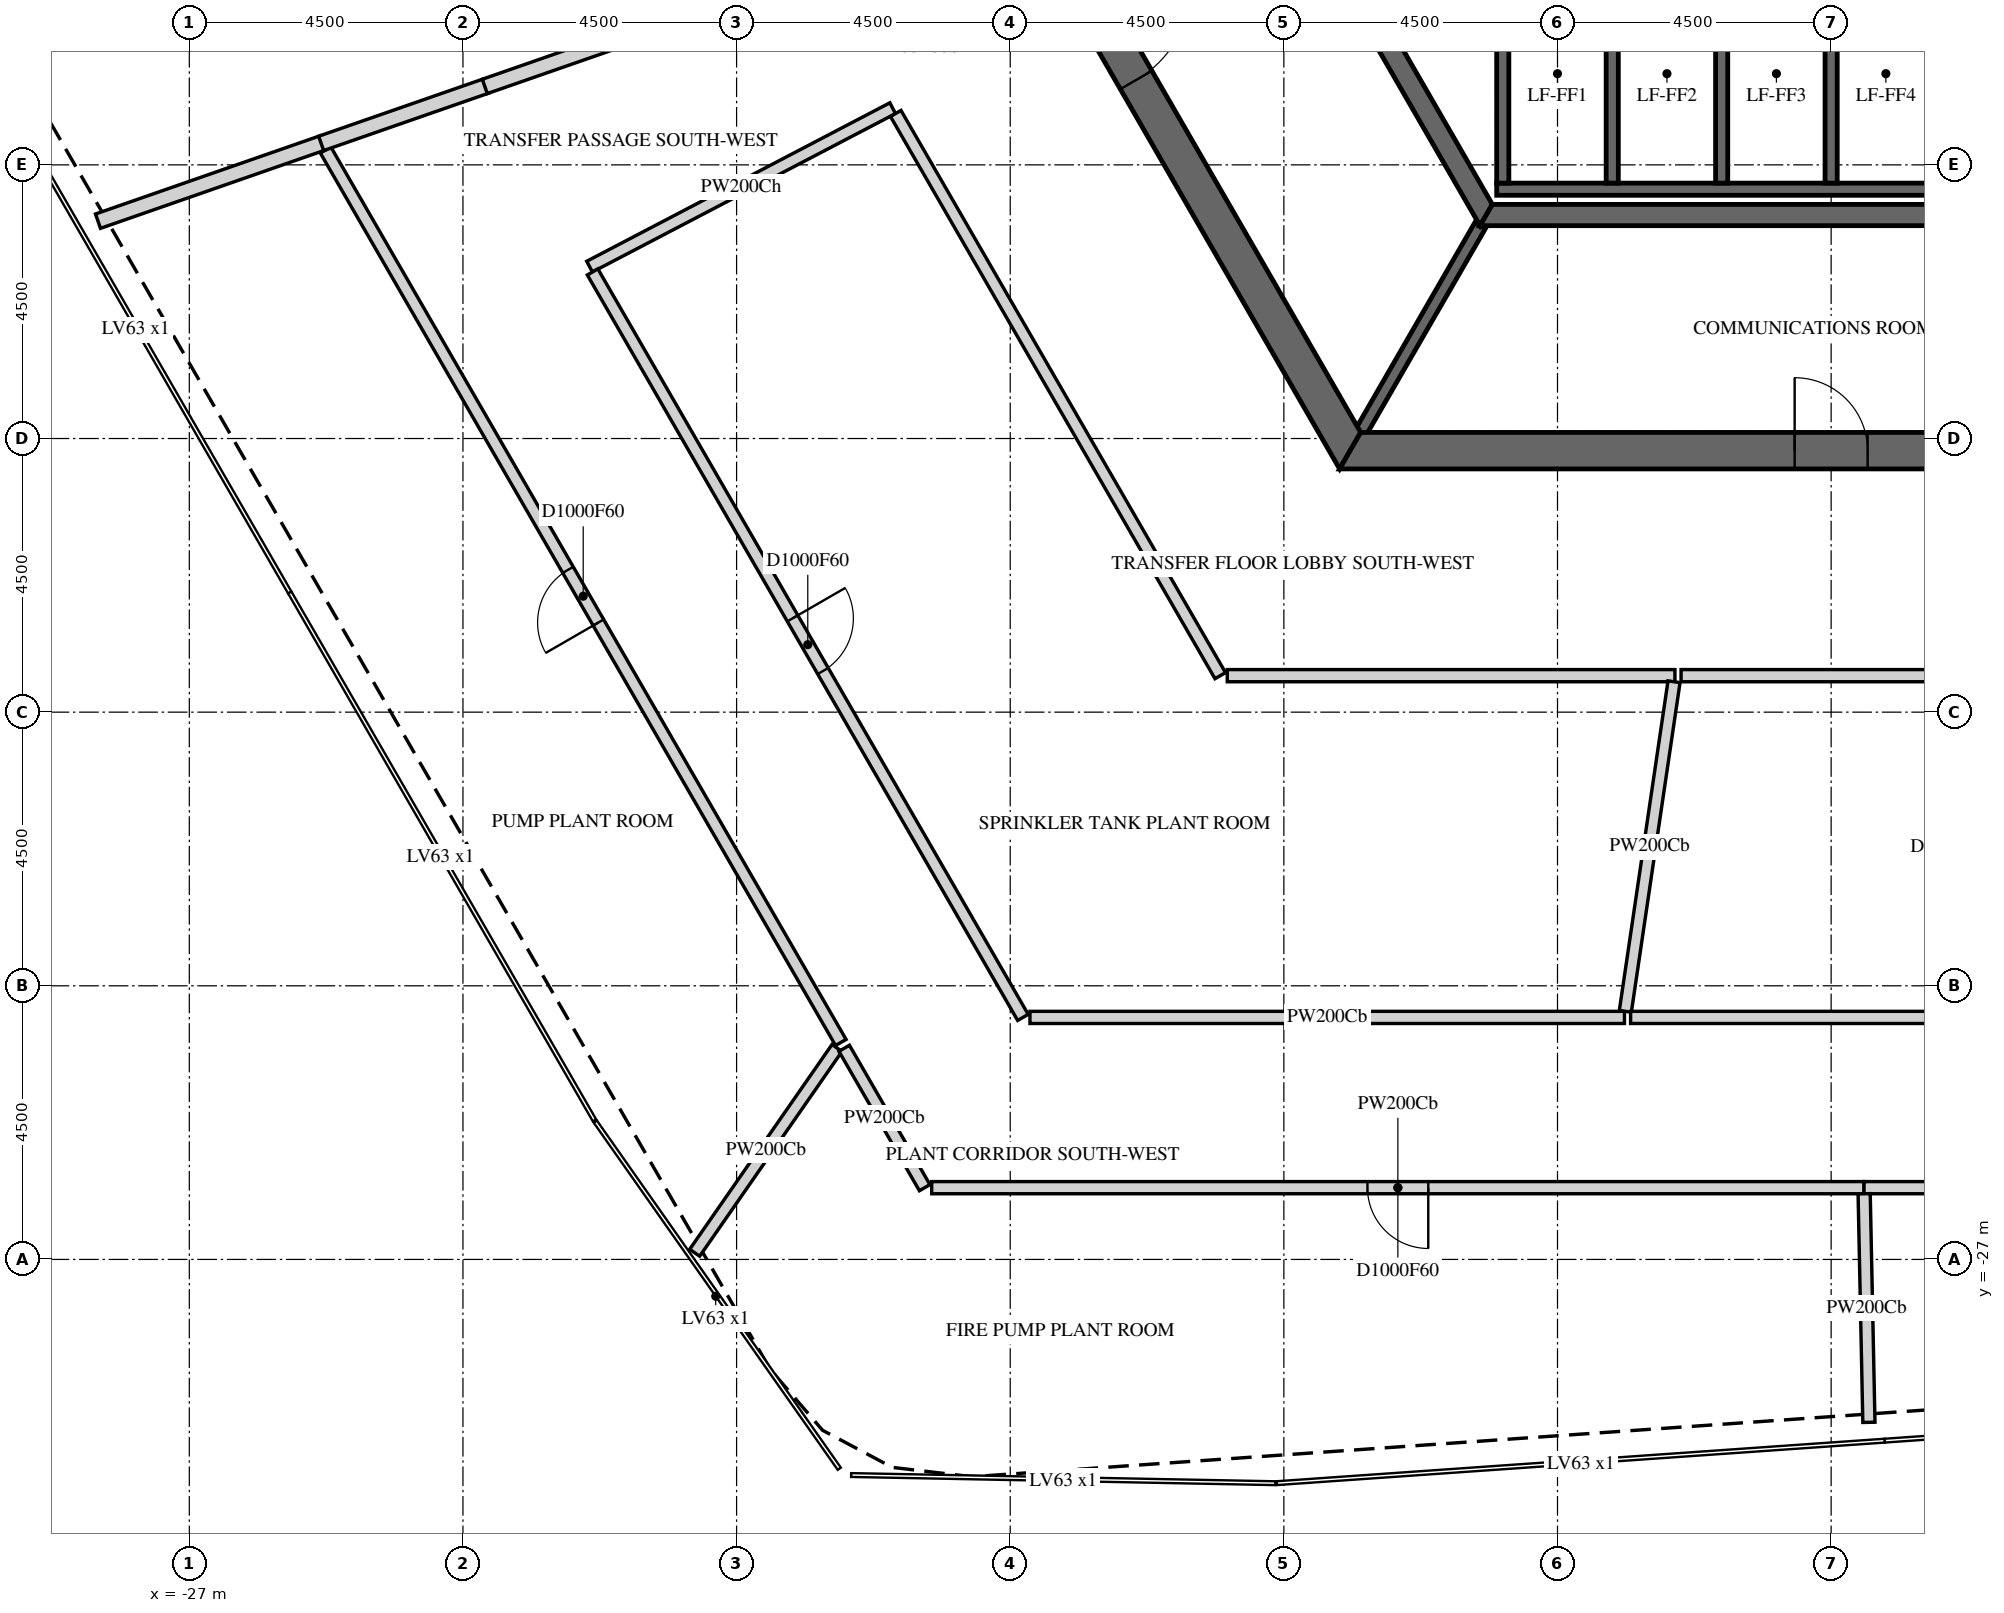
"""IFC4 building model, lengths in metres.
Left out: names, types, materials, properties, quantities, classifications, styles, units other than length and angle.
Written with IfcOpenShell. Run it as: python <this file> out.ifc"""

import sys

from ifc_helpers import new_model, si_unit, direction, frame, frame_2d, origin, place, context, subcontext, project, spatial, polyline, rectangle, outline, extrude, element, fill, save


model = new_model("IFC4")
c1 = context("Model", 3, precision=1e-05, world=origin(), true_north=direction((0.0, 1.0)))
c2 = subcontext(c1, "Body", "Model", "MODEL_VIEW")
j1 = project(units=[si_unit("LENGTHUNIT", "METRE"), si_unit("PLANEANGLEUNIT", "RADIAN")], contexts=[c1])
p1 = place(None, origin())
s1 = spatial("IfcSite", under=j1, at=p1, CompositionType="ELEMENT")
p2 = place(p1, origin())
s2 = spatial("IfcBuilding", under=s1, at=p2, CompositionType="ELEMENT")
p3 = place(p2, frame((0.0, 0.0, 31.5)))
s3 = spatial("IfcBuildingStorey", under=s2, at=p3, CompositionType="ELEMENT", Elevation=31.5)
p4 = place(p3, frame((-15.819, 0.0, -0.3), z_axis=(0.0, 0.0, 1.0), x_axis=(0.499999880136, -0.866025472988, 0.0)))
e1 = element("IfcWall", 1, at=p4, inside=s3, PredefinedType="SHEAR", context=c2, shape_type="SweptSolid", body=[
    extrude(outline(polyline([(-0.173, -0.3), (15.993, -0.3), (15.646, 0.3), (0.173, 0.3), (-0.173, -0.3)])), origin(), (0.0, 0.0, 1.0), 6.15),
])
p5 = place(p4, frame((6.981, 0.0, 0.3)))
e2 = element("IfcOpeningElement", 2, at=p5, cuts=e1, PredefinedType="OPENING", context=c2, shape_type="SweptSolid", body=[
    extrude(rectangle(XDim=1.8, YDim=2.4, at=frame_2d((0.9, 1.2))), frame((0.0, 0.31, 0.0), z_axis=(0.0, -1.0, 0.0), x_axis=(1.0, 0.0, 0.0)), (0.0, 0.0, 1.0), 0.62),
])
p6 = place(p3, frame((-7.91, -13.7, -0.3), z_axis=(0.0, 0.0, 1.0), x_axis=(1.0, 0.0, 0.0)))
e3 = element("IfcWall", 3, at=p6, inside=s3, PredefinedType="SHEAR", context=c2, shape_type="SweptSolid", body=[
    extrude(outline(polyline([(-0.173, -0.3), (15.993, -0.3), (15.646, 0.3), (0.173, 0.3), (-0.173, -0.3)])), origin(), (0.0, 0.0, 1.0), 6.15),
])
p7 = place(p6, frame((7.31, 0.0, 0.3)))
e4 = element("IfcOpeningElement", 4, at=p7, cuts=e3, PredefinedType="OPENING", context=c2, shape_type="SweptSolid", body=[
    extrude(rectangle(XDim=1.2, YDim=2.4, at=frame_2d((0.6, 1.2))), frame((0.0, 0.31, 0.0), z_axis=(0.0, -1.0, 0.0), x_axis=(1.0, 0.0, 0.0)), (0.0, 0.0, 1.0), 0.62),
])
p8 = place(p3, frame((-11.345, 0.0, -0.3), z_axis=(0.0, 0.0, 1.0), x_axis=(0.499995046907, -0.866028263435, 0.0)))
e5 = element("IfcWall", 5, at=p8, inside=s3, PredefinedType="SHEAR", context=c2, shape_type="SweptSolid", body=[
    extrude(outline(polyline([(-0.101, -0.175), (11.446, -0.175), (11.244, 0.175), (0.101, 0.175), (-0.101, -0.175)])), origin(), (0.0, 0.0, 1.0), 6.15),
])
p9 = place(p8, frame((4.744, 0.0, 0.3)))
e6 = element("IfcOpeningElement", 6, at=p9, cuts=e5, PredefinedType="OPENING", context=c2, shape_type="SweptSolid", body=[
    extrude(rectangle(XDim=1.8, YDim=2.4, at=frame_2d((0.9, 1.2))), frame((0.0, 0.185, 0.0), z_axis=(0.0, -1.0, 0.0), x_axis=(1.0, 0.0, 0.0)), (0.0, 0.0, 1.0), 0.37),
])
p10 = place(p3, frame((-5.673, -9.825, -0.3), z_axis=(0.0, 0.0, 1.0), x_axis=(1.0, 0.0, 0.0)))
e7 = element("IfcWall", 7, at=p10, inside=s3, PredefinedType="SHEAR", context=c2, shape_type="SweptSolid", body=[
    extrude(outline(polyline([(-0.101, -0.175), (11.446, -0.175), (11.244, 0.175), (0.101, 0.175), (-0.101, -0.175)])), origin(), (0.0, 0.0, 1.0), 6.15),
])
p11 = place(p3, frame((-5.5, -9.4, -0.25), z_axis=(0.0, 0.0, 1.0), x_axis=(1.0, 0.0, 0.0)))
e8 = element("IfcWall", 8, at=p11, inside=s3, PredefinedType="SHEAR", context=c2, shape_type="SweptSolid", body=[
    extrude(rectangle(XDim=9.2, YDim=0.2, at=frame_2d((4.6, 0.0))), origin(), (0.0, 0.0, 1.0), 6.0),
])
for number, where, z_axis, x_axis in (
    (9, (-5.4, -9.3, -0.25), (0.0, 0.0, 1.0), (0.0, 1.0, 0.0)),
    (10, (-3.6, -9.3, -0.25), (0.0, 0.0, 1.0), (0.0, 1.0, 0.0)),
    (11, (-1.8, -9.3, -0.25), (0.0, 0.0, 1.0), (0.0, 1.0, 0.0)),
    (12, (0.0, -9.3, -0.25), (0.0, 0.0, 1.0), (0.0, 1.0, 0.0)),
):
    element("IfcWall", number, at=place(p3, frame(where, z_axis=z_axis, x_axis=x_axis)), inside=s3, PredefinedType="SHEAR", context=c2, shape_type="SweptSolid", body=[
        extrude(rectangle(XDim=2.9, YDim=0.2, at=frame_2d((1.45, 0.0))), origin(), (0.0, 0.0, 1.0), 6.0),
    ])
p12 = place(p3, frame((-5.773, -10.0, -0.3), z_axis=(0.0, 0.0, 1.0), x_axis=(-0.500038251005, -0.86600331843, 0.0)))
e13 = element("IfcWall", 13, at=p12, inside=s3, PredefinedType="SHEAR", context=c2, shape_type="SweptSolid", body=[
    extrude(rectangle(XDim=3.926, YDim=0.2, at=frame_2d((1.963, 0.0))), origin(), (0.0, 0.0, 1.0), 6.15),
])
p13 = place(p3, frame((-16.286, -23.432, 0.0), z_axis=(0.0, 0.0, 1.0), x_axis=(-0.49996436611, 0.866045976043, 0.0)))
e14 = element("IfcWall", 14, at=p13, inside=s3, PredefinedType="PARTITIONING", context=c2, shape_type="SweptSolid", body=[
    extrude(rectangle(XDim=16.948, YDim=0.2, at=frame_2d((8.474, 0.0))), origin(), (0.0, 0.0, 1.0), 5.85),
])
p14 = place(p13, frame((7.974, 0.0, 0.0)))
e15 = element("IfcOpeningElement", 15, at=p14, cuts=e14, PredefinedType="OPENING", context=c2, shape_type="SweptSolid", body=[
    extrude(rectangle(XDim=1.0, YDim=2.1, at=frame_2d((0.5, 1.05))), frame((0.0, 0.11, 0.0), z_axis=(0.0, -1.0, 0.0), x_axis=(1.0, 0.0, 0.0)), (0.0, 0.0, 1.0), 0.22),
])
p15 = place(p3, frame((-24.813, -8.641, 0.0), z_axis=(0.0, 0.0, 1.0), x_axis=(-0.944373627708, -0.328874522105, 0.0)))
e16 = element("IfcWall", 16, at=p15, inside=s3, PredefinedType="PARTITIONING", context=c2, shape_type="SweptSolid", body=[
    extrude(rectangle(XDim=3.906, YDim=0.25, at=frame_2d((1.953, 0.0))), origin(), (0.0, 0.0, 1.0), 5.088),
])
p16 = place(p3, frame((-22.122, -7.704, 0.0), z_axis=(0.0, 0.0, 1.0), x_axis=(-0.944466947751, -0.328606428127, 0.0)))
e17 = element("IfcWall", 17, at=p16, inside=s3, PredefinedType="PARTITIONING", context=c2, shape_type="SweptSolid", body=[
    extrude(rectangle(XDim=2.869, YDim=0.25, at=frame_2d((1.435, 0.0))), origin(), (0.0, 0.0, 1.0), 5.088),
])
p17 = place(p3, frame((-20.418, -10.674, 0.0), z_axis=(0.0, 0.0, 1.0), x_axis=(0.886208434204, 0.463286748295, 0.0)))
e18 = element("IfcWall", 18, at=p17, inside=s3, PredefinedType="PARTITIONING", context=c2, shape_type="SweptSolid", body=[
    extrude(rectangle(XDim=5.625, YDim=0.2, at=frame_2d((2.812, 0.0))), origin(), (0.0, 0.0, 1.0), 5.096),
])
p18 = place(p3, frame((-18.689, -26.89, 0.0), z_axis=(0.0, 0.0, 1.0), x_axis=(0.570657976863, 0.821187842971, 0.0)))
e19 = element("IfcWall", 19, at=p18, inside=s3, PredefinedType="PARTITIONING", context=c2, shape_type="SweptSolid", body=[
    extrude(rectangle(XDim=4.101, YDim=0.2, at=frame_2d((2.05, 0.0))), origin(), (0.0, 0.0, 1.0), 5.85),
])
p19 = place(p3, frame((-16.718, -5.822, 0.0), z_axis=(0.0, 0.0, 1.0), x_axis=(-0.944407858517, -0.328776210774, 0.0)))
e20 = element("IfcWall", 20, at=p19, inside=s3, PredefinedType="PARTITIONING", context=c2, shape_type="SweptSolid", body=[
    extrude(rectangle(XDim=5.742, YDim=0.25, at=frame_2d((2.871, 0.0))), origin(), (0.0, 0.0, 1.0), 5.088),
])
p20 = place(p3, frame((-16.231, -23.528, 0.0), z_axis=(0.0, 0.0, 1.0), x_axis=(0.500047101561, -0.865998207978, 0.0)))
e21 = element("IfcWall", 21, at=p20, inside=s3, PredefinedType="PARTITIONING", context=c2, shape_type="SweptSolid", body=[
    extrude(rectangle(XDim=2.647, YDim=0.2, at=frame_2d((1.324, 0.0))), origin(), (0.0, 0.0, 1.0), 5.85),
])
p21 = place(p3, frame((-15.383, -8.155, 0.0), z_axis=(0.0, 0.0, 1.0), x_axis=(0.499963979216, -0.866046199395, 0.0)))
e22 = element("IfcWall", 22, at=p21, inside=s3, PredefinedType="PARTITIONING", context=c2, shape_type="SweptSolid", body=[
    extrude(rectangle(XDim=10.675, YDim=0.2, at=frame_2d((5.337, 0.0))), origin(), (0.0, 0.0, 1.0), 5.85),
])
p22 = place(p3, frame((0.541, -25.82, 0.0), z_axis=(0.0, 0.0, 1.0), x_axis=(-1.0, 0.0, 0.0)))
e23 = element("IfcWall", 23, at=p22, inside=s3, PredefinedType="PARTITIONING", context=c2, shape_type="SweptSolid", body=[
    extrude(rectangle(XDim=15.333, YDim=0.2, at=frame_2d((7.666, 0.0))), origin(), (0.0, 0.0, 1.0), 5.85),
])
p23 = place(p22, frame((7.166, 0.0, 0.0)))
e24 = element("IfcOpeningElement", 24, at=p23, cuts=e23, PredefinedType="OPENING", context=c2, shape_type="SweptSolid", body=[
    extrude(rectangle(XDim=1.0, YDim=2.1, at=frame_2d((0.5, 1.05))), frame((0.0, 0.11, 0.0), z_axis=(0.0, -1.0, 0.0), x_axis=(1.0, 0.0, 0.0)), (0.0, 0.0, 1.0), 0.22),
])
p24 = place(p3, frame((-20.368, -10.761, 0.0), z_axis=(0.0, 0.0, 1.0), x_axis=(0.49994739805, -0.866055771404, 0.0)))
e25 = element("IfcWall", 25, at=p24, inside=s3, PredefinedType="PARTITIONING", context=c2, shape_type="SweptSolid", body=[
    extrude(rectangle(XDim=14.155, YDim=0.2, at=frame_2d((7.078, 0.0))), origin(), (0.0, 0.0, 1.0), 5.85),
])
p25 = place(p24, frame((6.578, 0.0, 0.0)))
e26 = element("IfcOpeningElement", 26, at=p25, cuts=e25, PredefinedType="OPENING", context=c2, shape_type="SweptSolid", body=[
    extrude(rectangle(XDim=1.0, YDim=2.1, at=frame_2d((0.5, 1.05))), frame((0.0, 0.11, 0.0), z_axis=(0.0, -1.0, 0.0), x_axis=(1.0, 0.0, 0.0)), (0.0, 0.0, 1.0), 0.22),
])
p26 = place(p3, frame((-9.93, -17.4, 0.0), z_axis=(0.0, 0.0, 1.0), x_axis=(1.0, 0.0, 0.0)))
e27 = element("IfcWall", 27, at=p26, inside=s3, PredefinedType="PARTITIONING", context=c2, shape_type="SweptSolid", body=[
    extrude(rectangle(XDim=7.361, YDim=0.2, at=frame_2d((3.681, 0.0))), origin(), (0.0, 0.0, 1.0), 5.85),
])
p27 = place(p3, frame((-3.399, -23.02, 0.0), z_axis=(0.0, 0.0, 1.0), x_axis=(-1.0, 0.0, 0.0)))
e28 = element("IfcWall", 28, at=p27, inside=s3, PredefinedType="PARTITIONING", context=c2, shape_type="SweptSolid", body=[
    extrude(rectangle(XDim=9.777, YDim=0.2, at=frame_2d((4.888, 0.0))), origin(), (0.0, 0.0, 1.0), 5.85),
])
p28 = place(p3, frame((-3.384, -22.92, 0.0), z_axis=(0.0, 0.0, 1.0), x_axis=(0.146117446513, 0.98926724995, 0.0)))
e29 = element("IfcWall", 29, at=p28, inside=s3, PredefinedType="PARTITIONING", context=c2, shape_type="SweptSolid", body=[
    extrude(rectangle(XDim=5.479, YDim=0.2, at=frame_2d((2.739, 0.0))), origin(), (0.0, 0.0, 1.0), 5.85),
])
p29 = place(p3, frame((-2.468, -17.4, 0.0), z_axis=(0.0, 0.0, 1.0), x_axis=(1.0, 0.0, 0.0)))
e30 = element("IfcWall", 30, at=p29, inside=s3, PredefinedType="PARTITIONING", context=c2, shape_type="SweptSolid", body=[
    extrude(rectangle(XDim=12.167, YDim=0.2, at=frame_2d((6.083, 0.0))), origin(), (0.0, 0.0, 1.0), 5.85),
])
p30 = place(p3, frame((14.561, -25.82, 0.0), z_axis=(0.0, 0.0, 1.0), x_axis=(-1.0, 0.0, 0.0)))
e31 = element("IfcWall", 31, at=p30, inside=s3, PredefinedType="PARTITIONING", context=c2, shape_type="SweptSolid", body=[
    extrude(rectangle(XDim=14.02, YDim=0.2, at=frame_2d((7.01, 0.0))), origin(), (0.0, 0.0, 1.0), 5.85),
])
p31 = place(p30, frame((6.51, 0.0, 0.0)))
e32 = element("IfcOpeningElement", 32, at=p31, cuts=e31, PredefinedType="OPENING", context=c2, shape_type="SweptSolid", body=[
    extrude(rectangle(XDim=1.0, YDim=2.1, at=frame_2d((0.5, 1.05))), frame((0.0, 0.11, 0.0), z_axis=(0.0, -1.0, 0.0), x_axis=(1.0, 0.0, 0.0)), (0.0, 0.0, 1.0), 0.22),
])
p32 = place(p3, frame((0.621, -29.679, 0.0), z_axis=(0.0, 0.0, 1.0), x_axis=(-0.020778782314, 0.999784097796, 0.0)))
e33 = element("IfcWall", 33, at=p32, inside=s3, PredefinedType="PARTITIONING", context=c2, shape_type="SweptSolid", body=[
    extrude(rectangle(XDim=3.76, YDim=0.2, at=frame_2d((1.88, 0.0))), origin(), (0.0, 0.0, 1.0), 5.85),
])
p33 = place(p3, frame((-3.298, -23.02, 0.0), z_axis=(0.0, 0.0, 1.0), x_axis=(1.0, 0.0, 0.0)))
e34 = element("IfcWall", 34, at=p33, inside=s3, PredefinedType="PARTITIONING", context=c2, shape_type="SweptSolid", body=[
    extrude(rectangle(XDim=16.242, YDim=0.2, at=frame_2d((8.121, 0.0))), origin(), (0.0, 0.0, 1.0), 5.85),
])
p34 = place(p33, frame((7.621, 0.0, 0.0)))
e35 = element("IfcOpeningElement", 35, at=p34, cuts=e34, PredefinedType="OPENING", context=c2, shape_type="SweptSolid", body=[
    extrude(rectangle(XDim=1.0, YDim=2.1, at=frame_2d((0.5, 1.05))), frame((0.0, 0.11, 0.0), z_axis=(0.0, -1.0, 0.0), x_axis=(1.0, 0.0, 0.0)), (0.0, 0.0, 1.0), 0.22),
])
p35 = place(p5, origin())
e36 = element("IfcDoor", 36, at=p35, inside=s3, OperationType="DOUBLE_DOOR_SINGLE_SWING", PredefinedType="DOOR", context=c2, shape_type="SweptSolid", body=[
    extrude(rectangle(XDim=1.8, YDim=2.4, at=frame_2d((0.9, 1.2))), frame((0.0, 0.025, 0.0), z_axis=(0.0, -1.0, 0.0), x_axis=(1.0, 0.0, 0.0)), (0.0, 0.0, 1.0), 0.05),
])
fill(e2, e36)
p36 = place(p7, origin())
e37 = element("IfcDoor", 37, at=p36, inside=s3, OperationType="SINGLE_SWING_LEFT", PredefinedType="DOOR", context=c2, shape_type="SweptSolid", body=[
    extrude(rectangle(XDim=1.2, YDim=2.4, at=frame_2d((0.6, 1.2))), frame((0.0, 0.025, 0.0), z_axis=(0.0, -1.0, 0.0), x_axis=(1.0, 0.0, 0.0)), (0.0, 0.0, 1.0), 0.05),
])
fill(e4, e37)
p37 = place(p14, origin())
e38 = element("IfcDoor", 38, at=p37, inside=s3, OperationType="SINGLE_SWING_LEFT", PredefinedType="DOOR", context=c2, shape_type="SweptSolid", body=[
    extrude(rectangle(XDim=1.0, YDim=2.1, at=frame_2d((0.5, 1.05))), frame((0.0, 0.025, 0.0), z_axis=(0.0, -1.0, 0.0), x_axis=(1.0, 0.0, 0.0)), (0.0, 0.0, 1.0), 0.05),
])
fill(e15, e38)
p38 = place(p23, origin())
e39 = element("IfcDoor", 39, at=p38, inside=s3, OperationType="SINGLE_SWING_LEFT", PredefinedType="DOOR", context=c2, shape_type="SweptSolid", body=[
    extrude(rectangle(XDim=1.0, YDim=2.1, at=frame_2d((0.5, 1.05))), frame((0.0, 0.025, 0.0), z_axis=(0.0, -1.0, 0.0), x_axis=(1.0, 0.0, 0.0)), (0.0, 0.0, 1.0), 0.05),
])
fill(e24, e39)
p39 = place(p25, origin())
e40 = element("IfcDoor", 40, at=p39, inside=s3, OperationType="SINGLE_SWING_LEFT", PredefinedType="DOOR", context=c2, shape_type="SweptSolid", body=[
    extrude(rectangle(XDim=1.0, YDim=2.1, at=frame_2d((0.5, 1.05))), frame((0.0, 0.025, 0.0), z_axis=(0.0, -1.0, 0.0), x_axis=(1.0, 0.0, 0.0)), (0.0, 0.0, 1.0), 0.05),
])
fill(e26, e40)
save(model, sys.argv[1])
